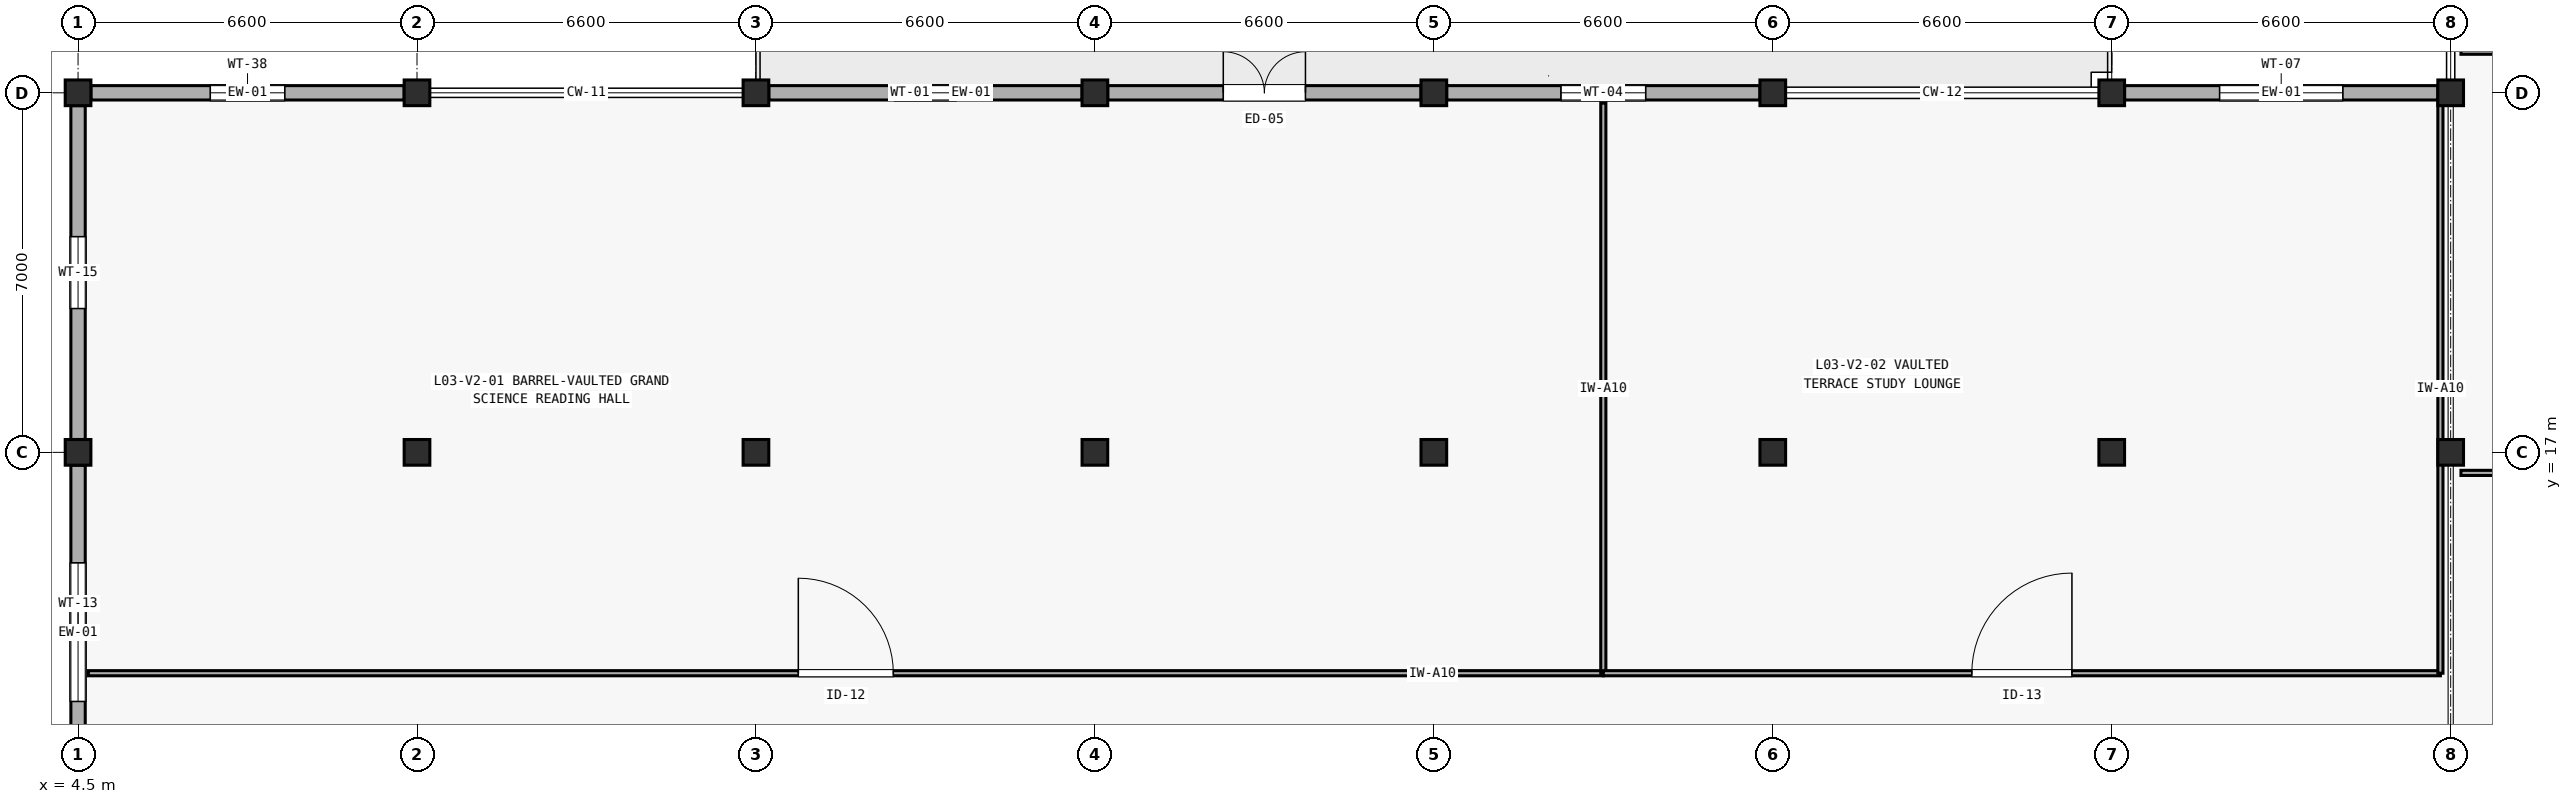
"""IFC4 building model, lengths in metres.
Left out: names, types, materials, properties, quantities, classifications, styles, units other than length and angle.
Written with IfcOpenShell. Run it as: python <this file> out.ifc"""

import sys

from ifc_helpers import new_model, si_unit, direction, frame, frame_2d, origin, origin_2d, place, context, subcontext, project, spatial, rectangle, extrude, element, fill, save


model = new_model("IFC4")
c1 = context("Model", 3, precision=1e-05, world=origin(), true_north=direction((0.0, 1.0)))
c2 = subcontext(c1, "Body", "Model", "MODEL_VIEW")
j1 = project(units=[si_unit("LENGTHUNIT", "METRE"), si_unit("PLANEANGLEUNIT", "RADIAN")], contexts=[c1])
p1 = place(None, origin())
s1 = spatial("IfcSite", under=j1, at=p1, CompositionType="ELEMENT")
p2 = place(p1, origin())
s2 = spatial("IfcBuilding", under=s1, at=p2, CompositionType="ELEMENT")
p3 = place(p2, frame((0.0, 0.0, 12.6)))
s3 = spatial("IfcBuildingStorey", under=s2, at=p3, CompositionType="ELEMENT", Elevation=12.6)
for number, where, z_axis, x_axis in (
    (1, (4.5, 17.0, 0.0), (0.0, 0.0, 1.0), (1.0, 0.0, 0.0)),
    (2, (4.5, 24.0, 0.0), (0.0, 0.0, 1.0), (1.0, 0.0, 0.0)),
    (3, (11.1, 17.0, 0.0), (0.0, 0.0, 1.0), (1.0, 0.0, 0.0)),
    (4, (11.1, 24.0, 0.0), (0.0, 0.0, 1.0), (1.0, 0.0, 0.0)),
    (5, (17.7, 17.0, 0.0), (0.0, 0.0, 1.0), (1.0, 0.0, 0.0)),
    (6, (17.7, 24.0, 0.0), (0.0, 0.0, 1.0), (1.0, 0.0, 0.0)),
    (7, (24.3, 17.0, 0.0), (0.0, 0.0, 1.0), (1.0, 0.0, 0.0)),
    (8, (24.3, 24.0, 0.0), (0.0, 0.0, 1.0), (1.0, 0.0, 0.0)),
    (9, (30.9, 17.0, 0.0), (0.0, 0.0, 1.0), (1.0, 0.0, 0.0)),
    (10, (30.9, 24.0, 0.0), (0.0, 0.0, 1.0), (1.0, 0.0, 0.0)),
    (11, (37.5, 17.0, 0.0), (0.0, 0.0, 1.0), (1.0, 0.0, 0.0)),
    (12, (37.5, 24.0, 0.0), (0.0, 0.0, 1.0), (1.0, 0.0, 0.0)),
    (13, (44.1, 17.0, 0.0), (0.0, 0.0, 1.0), (1.0, 0.0, 0.0)),
    (14, (44.1, 24.0, 0.0), (0.0, 0.0, 1.0), (1.0, 0.0, 0.0)),
    (15, (50.7, 17.0, 0.0), (0.0, 0.0, 1.0), (1.0, 0.0, 0.0)),
    (16, (50.7, 24.0, 0.0), (0.0, 0.0, 1.0), (1.0, 0.0, 0.0)),
):
    element("IfcColumn", number, at=place(p3, frame(where, z_axis=z_axis, x_axis=x_axis)), inside=s3, PredefinedType="COLUMN", context=c2, shape_type="SweptSolid", body=[
        extrude(rectangle(XDim=0.5, YDim=0.5, at=origin_2d()), origin(), (0.0, 0.0, 1.0), 4.2),
    ])
p4 = place(p3, frame((4.75, 24.0, 0.0), z_axis=(0.0, 0.0, 1.0), x_axis=(1.0, 0.0, 0.0)))
e17 = element("IfcWall", 17, at=p4, inside=s3, PredefinedType="SOLIDWALL", context=c2, shape_type="SweptSolid", body=[
    extrude(rectangle(XDim=6.1, YDim=0.28, at=frame_2d((3.05, 0.0))), origin(), (0.0, 0.0, 1.0), 3.365),
])
p5 = place(p4, frame((2.325, 0.0, 0.85)))
e18 = element("IfcOpeningElement", 18, at=p5, cuts=e17, PredefinedType="OPENING", context=c2, shape_type="SweptSolid", body=[
    extrude(rectangle(XDim=1.45, YDim=1.55, at=frame_2d((0.725, 0.775))), frame((0.0, 0.15, 0.0), z_axis=(0.0, -1.0, 0.0), x_axis=(1.0, 0.0, 0.0)), (0.0, 0.0, 1.0), 0.3),
])
p6 = place(p3, frame((17.95, 24.0, 0.0), z_axis=(0.0, 0.0, 1.0), x_axis=(1.0, 0.0, 0.0)))
e19 = element("IfcWall", 19, at=p6, inside=s3, PredefinedType="SOLIDWALL", context=c2, shape_type="SweptSolid", body=[
    extrude(rectangle(XDim=6.1, YDim=0.28, at=frame_2d((3.05, 0.0))), origin(), (0.0, 0.0, 1.0), 3.365),
])
p7 = place(p6, frame((2.45, 0.0, 0.85)))
e20 = element("IfcOpeningElement", 20, at=p7, cuts=e19, PredefinedType="OPENING", context=c2, shape_type="SweptSolid", body=[
    extrude(rectangle(XDim=1.2, YDim=1.35, at=frame_2d((0.6, 0.675))), frame((0.0, 0.15, 0.0), z_axis=(0.0, -1.0, 0.0), x_axis=(1.0, 0.0, 0.0)), (0.0, 0.0, 1.0), 0.3),
])
p8 = place(p3, frame((24.55, 24.0, 0.0), z_axis=(0.0, 0.0, 1.0), x_axis=(1.0, 0.0, 0.0)))
e21 = element("IfcWall", 21, at=p8, inside=s3, PredefinedType="SOLIDWALL", context=c2, shape_type="SweptSolid", body=[
    extrude(rectangle(XDim=6.1, YDim=0.28, at=frame_2d((3.05, 0.0))), origin(), (0.0, 0.0, 1.0), 3.365),
])
p9 = place(p8, frame((2.25, 0.0, 0.0)))
e22 = element("IfcOpeningElement", 22, at=p9, cuts=e21, PredefinedType="OPENING", context=c2, shape_type="SweptSolid", body=[
    extrude(rectangle(XDim=1.6, YDim=2.15, at=frame_2d((0.8, 1.075))), frame((0.0, 0.15, 0.0), z_axis=(0.0, -1.0, 0.0), x_axis=(1.0, 0.0, 0.0)), (0.0, 0.0, 1.0), 0.3),
])
p10 = place(p3, frame((31.15, 24.0, 0.0), z_axis=(0.0, 0.0, 1.0), x_axis=(1.0, 0.0, 0.0)))
e23 = element("IfcWall", 23, at=p10, inside=s3, PredefinedType="SOLIDWALL", context=c2, shape_type="SweptSolid", body=[
    extrude(rectangle(XDim=6.1, YDim=0.28, at=frame_2d((3.05, 0.0))), origin(), (0.0, 0.0, 1.0), 3.365),
])
p11 = place(p10, frame((2.225, 0.0, 0.85)))
e24 = element("IfcOpeningElement", 24, at=p11, cuts=e23, PredefinedType="OPENING", context=c2, shape_type="SweptSolid", body=[
    extrude(rectangle(XDim=1.65, YDim=1.35, at=frame_2d((0.825, 0.675))), frame((0.0, 0.15, 0.0), z_axis=(0.0, -1.0, 0.0), x_axis=(1.0, 0.0, 0.0)), (0.0, 0.0, 1.0), 0.3),
])
p12 = place(p3, frame((44.35, 24.0, 0.0), z_axis=(0.0, 0.0, 1.0), x_axis=(1.0, 0.0, 0.0)))
e25 = element("IfcWall", 25, at=p12, inside=s3, PredefinedType="SOLIDWALL", context=c2, shape_type="SweptSolid", body=[
    extrude(rectangle(XDim=6.1, YDim=0.28, at=frame_2d((3.05, 0.0))), origin(), (0.0, 0.0, 1.0), 3.365),
])
p13 = place(p12, frame((1.85, 0.0, 0.85)))
e26 = element("IfcOpeningElement", 26, at=p13, cuts=e25, PredefinedType="OPENING", context=c2, shape_type="SweptSolid", body=[
    extrude(rectangle(XDim=2.4, YDim=1.35, at=frame_2d((1.2, 0.675))), frame((0.0, 0.15, 0.0), z_axis=(0.0, -1.0, 0.0), x_axis=(1.0, 0.0, 0.0)), (0.0, 0.0, 1.0), 0.3),
])
p14 = place(p3, frame((4.5, 10.25, 0.0), z_axis=(0.0, 0.0, 1.0), x_axis=(0.0, 1.0, 0.0)))
e27 = element("IfcWall", 27, at=p14, inside=s3, PredefinedType="SOLIDWALL", context=c2, shape_type="SweptSolid", body=[
    extrude(rectangle(XDim=6.5, YDim=0.28, at=frame_2d((3.25, 0.0))), origin(), (0.0, 0.0, 1.0), 3.365),
])
p15 = place(p14, frame((1.9, 0.0, 0.85)))
e28 = element("IfcOpeningElement", 28, at=p15, cuts=e27, PredefinedType="OPENING", context=c2, shape_type="SweptSolid", body=[
    extrude(rectangle(XDim=2.7, YDim=1.5, at=frame_2d((1.35, 0.75))), frame((0.0, 0.15, 0.0), z_axis=(0.0, -1.0, 0.0), x_axis=(1.0, 0.0, 0.0)), (0.0, 0.0, 1.0), 0.3),
])
p16 = place(p3, frame((4.5, 17.25, 0.0), z_axis=(0.0, 0.0, 1.0), x_axis=(0.0, 1.0, 0.0)))
e29 = element("IfcWall", 29, at=p16, inside=s3, PredefinedType="SOLIDWALL", context=c2, shape_type="SweptSolid", body=[
    extrude(rectangle(XDim=6.5, YDim=0.28, at=frame_2d((3.25, 0.0))), origin(), (0.0, 0.0, 1.0), 3.365),
])
p17 = place(p16, frame((2.55, 0.0, 0.85)))
e30 = element("IfcOpeningElement", 30, at=p17, cuts=e29, PredefinedType="OPENING", context=c2, shape_type="SweptSolid", body=[
    extrude(rectangle(XDim=1.4, YDim=1.25, at=frame_2d((0.7, 0.625))), frame((0.0, 0.15, 0.0), z_axis=(0.0, -1.0, 0.0), x_axis=(1.0, 0.0, 0.0)), (0.0, 0.0, 1.0), 0.3),
])
p18 = place(p3, frame((4.7, 12.7, 0.0), z_axis=(0.0, 0.0, 1.0), x_axis=(1.0, 0.0, 0.0)))
e31 = element("IfcWall", 31, at=p18, inside=s3, PredefinedType="PARTITIONING", context=c2, shape_type="SweptSolid", body=[
    extrude(rectangle(XDim=29.5, YDim=0.1, at=frame_2d((14.75, 0.0))), origin(), (0.0, 0.0, 1.0), 3.9),
])
p19 = place(p18, frame((13.825, 0.0, 0.0)))
e32 = element("IfcOpeningElement", 32, at=p19, cuts=e31, PredefinedType="OPENING", context=c2, shape_type="SweptSolid", body=[
    extrude(rectangle(XDim=1.85, YDim=2.3, at=frame_2d((0.925, 1.15))), frame((0.0, 0.06, 0.0), z_axis=(0.0, -1.0, 0.0), x_axis=(1.0, 0.0, 0.0)), (0.0, 0.0, 1.0), 0.12),
])
p20 = place(p3, frame((34.2, 12.7, 0.0), z_axis=(0.0, 0.0, 1.0), x_axis=(0.0, 1.0, 0.0)))
e33 = element("IfcWall", 33, at=p20, inside=s3, PredefinedType="PARTITIONING", context=c2, shape_type="SweptSolid", body=[
    extrude(rectangle(XDim=11.1, YDim=0.1, at=frame_2d((5.55, 0.0))), origin(), (0.0, 0.0, 1.0), 3.9),
])
p21 = place(p3, frame((34.2, 12.7, 0.0), z_axis=(0.0, 0.0, 1.0), x_axis=(1.0, 0.0, 0.0)))
e34 = element("IfcWall", 34, at=p21, inside=s3, PredefinedType="PARTITIONING", context=c2, shape_type="SweptSolid", body=[
    extrude(rectangle(XDim=16.3, YDim=0.1, at=frame_2d((8.15, 0.0))), origin(), (0.0, 0.0, 1.0), 3.9),
])
p22 = place(p21, frame((7.175, 0.0, 0.0)))
e35 = element("IfcOpeningElement", 35, at=p22, cuts=e34, PredefinedType="OPENING", context=c2, shape_type="SweptSolid", body=[
    extrude(rectangle(XDim=1.95, YDim=2.3, at=frame_2d((0.975, 1.15))), frame((0.0, 0.06, 0.0), z_axis=(0.0, -1.0, 0.0), x_axis=(1.0, 0.0, 0.0)), (0.0, 0.0, 1.0), 0.12),
])
p23 = place(p3, frame((50.5, 12.7, 0.0), z_axis=(0.0, 0.0, 1.0), x_axis=(0.0, 1.0, 0.0)))
e36 = element("IfcWall", 36, at=p23, inside=s3, PredefinedType="PARTITIONING", context=c2, shape_type="SweptSolid", body=[
    extrude(rectangle(XDim=11.1, YDim=0.1, at=frame_2d((5.55, 0.0))), origin(), (0.0, 0.0, 1.0), 3.365),
])
p24 = place(p3, frame((50.9, 16.6, 0.0), z_axis=(0.0, 0.0, 1.0), x_axis=(1.0, 0.0, 0.0)))
e37 = element("IfcWall", 37, at=p24, inside=s3, PredefinedType="PARTITIONING", context=c2, shape_type="SweptSolid", body=[
    extrude(rectangle(XDim=16.6, YDim=0.1, at=frame_2d((8.3, 0.0))), origin(), (0.0, 0.0, 1.0), 3.9),
])
p25 = place(p3, frame((50.9, 24.8, 0.0), z_axis=(0.0, 0.0, 1.0), x_axis=(1.0, 0.0, 0.0)))
e38 = element("IfcWall", 38, at=p25, inside=s3, PredefinedType="PARTITIONING", context=c2, shape_type="SweptSolid", body=[
    extrude(rectangle(XDim=16.6, YDim=0.1, at=frame_2d((8.3, 0.0))), origin(), (0.0, 0.0, 1.0), 3.9),
])
p26 = place(p25, frame((7.85, 0.0, 0.0)))
e39 = element("IfcOpeningElement", 39, at=p26, cuts=e38, PredefinedType="OPENING", context=c2, shape_type="SweptSolid", body=[
    extrude(rectangle(XDim=1.7, YDim=2.2, at=frame_2d((0.85, 1.1))), frame((0.0, 0.06, 0.0), z_axis=(0.0, -1.0, 0.0), x_axis=(1.0, 0.0, 0.0)), (0.0, 0.0, 1.0), 0.12),
])
p27 = place(p5, origin())
e40 = element("IfcWindow", 40, at=p27, inside=s3, PartitioningType="SINGLE_PANEL", PredefinedType="WINDOW", context=c2, shape_type="SweptSolid", body=[
    extrude(rectangle(XDim=1.45, YDim=1.55, at=frame_2d((0.725, 0.775))), frame((0.0, 0.03, 0.0), z_axis=(0.0, -1.0, 0.0), x_axis=(1.0, 0.0, 0.0)), (0.0, 0.0, 1.0), 0.06),
])
fill(e18, e40)
p28 = place(p7, origin())
e41 = element("IfcWindow", 41, at=p28, inside=s3, PartitioningType="SINGLE_PANEL", PredefinedType="WINDOW", context=c2, shape_type="SweptSolid", body=[
    extrude(rectangle(XDim=1.2, YDim=1.35, at=frame_2d((0.6, 0.675))), frame((0.0, 0.03, 0.0), z_axis=(0.0, -1.0, 0.0), x_axis=(1.0, 0.0, 0.0)), (0.0, 0.0, 1.0), 0.06),
])
fill(e20, e41)
p29 = place(p9, origin())
e42 = element("IfcDoor", 42, at=p29, inside=s3, OperationType="DOUBLE_DOOR_SINGLE_SWING", PredefinedType="DOOR", context=c2, shape_type="SweptSolid", body=[
    extrude(rectangle(XDim=1.6, YDim=2.15, at=frame_2d((0.8, 1.075))), frame((0.0, 0.025, 0.0), z_axis=(0.0, -1.0, 0.0), x_axis=(1.0, 0.0, 0.0)), (0.0, 0.0, 1.0), 0.05),
])
fill(e22, e42)
p30 = place(p11, origin())
e43 = element("IfcWindow", 43, at=p30, inside=s3, PartitioningType="SINGLE_PANEL", PredefinedType="WINDOW", context=c2, shape_type="SweptSolid", body=[
    extrude(rectangle(XDim=1.65, YDim=1.35, at=frame_2d((0.825, 0.675))), frame((0.0, 0.03, 0.0), z_axis=(0.0, -1.0, 0.0), x_axis=(1.0, 0.0, 0.0)), (0.0, 0.0, 1.0), 0.06),
])
fill(e24, e43)
p31 = place(p13, origin())
e44 = element("IfcWindow", 44, at=p31, inside=s3, PartitioningType="SINGLE_PANEL", PredefinedType="WINDOW", context=c2, shape_type="SweptSolid", body=[
    extrude(rectangle(XDim=2.4, YDim=1.35, at=frame_2d((1.2, 0.675))), frame((0.0, 0.03, 0.0), z_axis=(0.0, -1.0, 0.0), x_axis=(1.0, 0.0, 0.0)), (0.0, 0.0, 1.0), 0.06),
])
fill(e26, e44)
p32 = place(p15, origin())
e45 = element("IfcWindow", 45, at=p32, inside=s3, PartitioningType="SINGLE_PANEL", PredefinedType="WINDOW", context=c2, shape_type="SweptSolid", body=[
    extrude(rectangle(XDim=2.7, YDim=1.5, at=frame_2d((1.35, 0.75))), frame((0.0, 0.03, 0.0), z_axis=(0.0, -1.0, 0.0), x_axis=(1.0, 0.0, 0.0)), (0.0, 0.0, 1.0), 0.06),
])
fill(e28, e45)
p33 = place(p17, origin())
e46 = element("IfcWindow", 46, at=p33, inside=s3, PartitioningType="SINGLE_PANEL", PredefinedType="WINDOW", context=c2, shape_type="SweptSolid", body=[
    extrude(rectangle(XDim=1.4, YDim=1.25, at=frame_2d((0.7, 0.625))), frame((0.0, 0.03, 0.0), z_axis=(0.0, -1.0, 0.0), x_axis=(1.0, 0.0, 0.0)), (0.0, 0.0, 1.0), 0.06),
])
fill(e30, e46)
p34 = place(p19, origin())
e47 = element("IfcDoor", 47, at=p34, inside=s3, OperationType="SINGLE_SWING_LEFT", PredefinedType="DOOR", context=c2, shape_type="SweptSolid", body=[
    extrude(rectangle(XDim=1.85, YDim=2.3, at=frame_2d((0.925, 1.15))), frame((0.0, 0.025, 0.0), z_axis=(0.0, -1.0, 0.0), x_axis=(1.0, 0.0, 0.0)), (0.0, 0.0, 1.0), 0.05),
])
fill(e32, e47)
p35 = place(p22, origin())
e48 = element("IfcDoor", 48, at=p35, inside=s3, OperationType="SINGLE_SWING_RIGHT", PredefinedType="DOOR", context=c2, shape_type="SweptSolid", body=[
    extrude(rectangle(XDim=1.95, YDim=2.3, at=frame_2d((0.975, 1.15))), frame((0.0, 0.025, 0.0), z_axis=(0.0, -1.0, 0.0), x_axis=(1.0, 0.0, 0.0)), (0.0, 0.0, 1.0), 0.05),
])
fill(e35, e48)
save(model, sys.argv[1])
